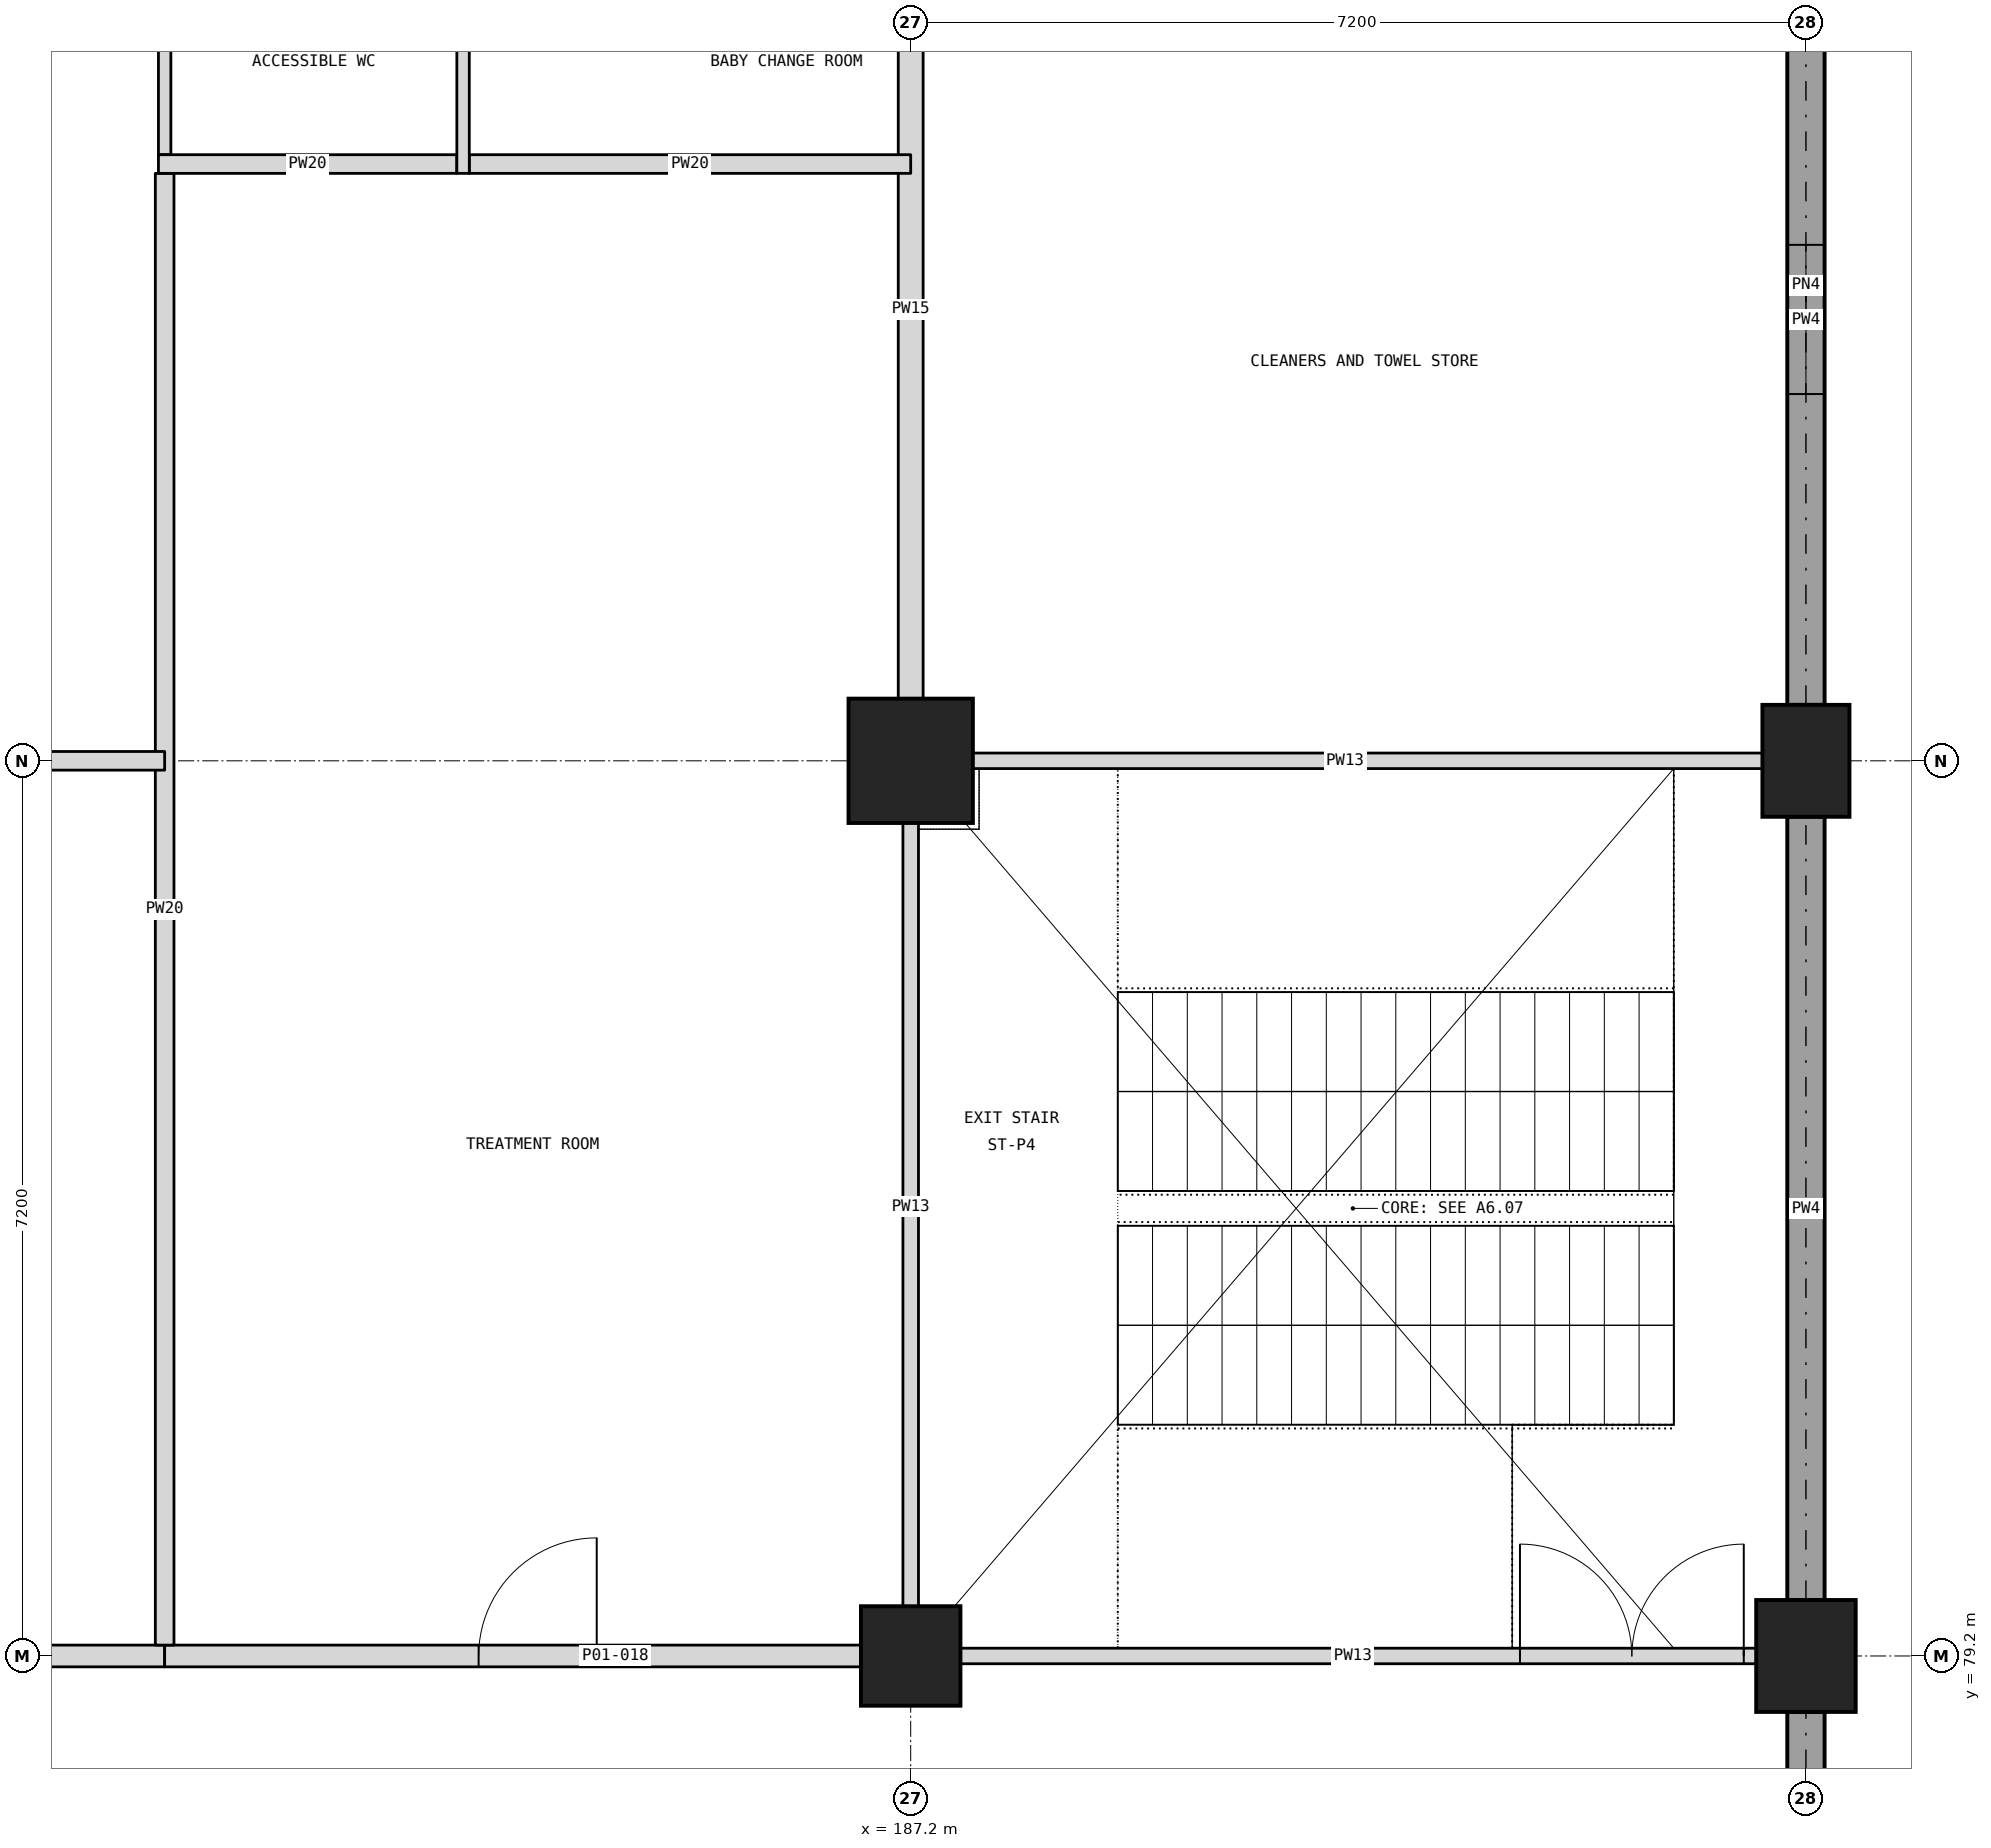
"""IFC4 building model, lengths in metres.
Left out: names, types, materials, properties, quantities, classifications, styles, units other than length and angle.
Written with IfcOpenShell. Run it as: python <this file> out.ifc"""

import sys

from ifc_helpers import new_model, si_unit, direction, frame, frame_2d, origin, origin_2d, place, context, subcontext, project, spatial, rectangle, extrude, element, fill, save


model = new_model("IFC4")
c1 = context("Model", 3, precision=1e-05, world=origin(), true_north=direction((0.0, 1.0)))
c2 = subcontext(c1, "Body", "Model", "MODEL_VIEW")
j1 = project(units=[si_unit("LENGTHUNIT", "METRE"), si_unit("PLANEANGLEUNIT", "RADIAN")], contexts=[c1])
p1 = place(None, origin())
s1 = spatial("IfcSite", under=j1, at=p1, CompositionType="ELEMENT")
p2 = place(p1, origin())
s2 = spatial("IfcBuilding", under=s1, at=p2, CompositionType="ELEMENT")
p3 = place(p2, frame((0.0, 0.0, 6.0)))
s3 = spatial("IfcBuildingStorey", under=s2, at=p3, CompositionType="ELEMENT", Elevation=6.0)
p4 = place(p3, frame((187.2, 79.2, 0.0), z_axis=(0.0, 0.0, 1.0), x_axis=(1.0, 0.0, 0.0)))
e1 = element("IfcColumn", 1, at=p4, inside=s3, PredefinedType="COLUMN", context=c2, shape_type="SweptSolid", body=[
    extrude(rectangle(XDim=0.8, YDim=0.8, at=origin_2d()), origin(), (0.0, 0.0, 1.0), 6.0),
])
p5 = place(p3, frame((187.2, 86.4, 0.0), z_axis=(0.0, 0.0, 1.0), x_axis=(1.0, 0.0, 0.0)))
e2 = element("IfcColumn", 2, at=p5, inside=s3, PredefinedType="COLUMN", context=c2, shape_type="SweptSolid", body=[
    extrude(rectangle(XDim=1.0, YDim=1.0, at=origin_2d()), origin(), (0.0, 0.0, 1.0), 6.0),
])
p6 = place(p3, frame((194.4, 79.2, 0.0), z_axis=(0.0, 0.0, 1.0), x_axis=(1.0, 0.0, 0.0)))
e3 = element("IfcColumn", 3, at=p6, inside=s3, PredefinedType="COLUMN", context=c2, shape_type="SweptSolid", body=[
    extrude(rectangle(XDim=0.8, YDim=0.9, at=origin_2d()), origin(), (0.0, 0.0, 1.0), 6.0),
])
p7 = place(p3, frame((194.4, 86.4, 0.0), z_axis=(0.0, 0.0, 1.0), x_axis=(1.0, 0.0, 0.0)))
e4 = element("IfcColumn", 4, at=p7, inside=s3, PredefinedType="COLUMN", context=c2, shape_type="SweptSolid", body=[
    extrude(rectangle(XDim=0.7, YDim=0.9, at=origin_2d()), origin(), (0.0, 0.0, 1.0), 6.0),
])
p8 = place(p3, frame((194.4, 72.45, 0.0), z_axis=(0.0, 0.0, 1.0), x_axis=(0.0, 1.0, 0.0)))
e5 = element("IfcWall", 5, at=p8, inside=s3, PredefinedType="SOLIDWALL", context=c2, shape_type="SweptSolid", body=[
    extrude(rectangle(XDim=6.3, YDim=0.3, at=frame_2d((3.15, 0.0))), origin(), (0.0, 0.0, 1.0), 5.1),
])
p9 = place(p8, frame((0.675, 0.0, 0.9)))
e6 = element("IfcOpeningElement", 6, at=p9, cuts=e5, PredefinedType="OPENING", context=c2, shape_type="SweptSolid", body=[
    extrude(rectangle(XDim=3.0, YDim=2.4, at=frame_2d((1.5, 1.2))), frame((0.0, 0.16, 0.0), z_axis=(0.0, -1.0, 0.0), x_axis=(1.0, 0.0, 0.0)), (0.0, 0.0, 1.0), 0.32),
])
p10 = place(p3, frame((194.4, 79.65, 0.0), z_axis=(0.0, 0.0, 1.0), x_axis=(0.0, 1.0, 0.0)))
e7 = element("IfcWall", 7, at=p10, inside=s3, PredefinedType="SOLIDWALL", context=c2, shape_type="SweptSolid", body=[
    extrude(rectangle(XDim=6.3, YDim=0.3, at=frame_2d((3.15, 0.0))), origin(), (0.0, 0.0, 1.0), 5.1),
])
p11 = place(p3, frame((194.4, 86.85, 0.0), z_axis=(0.0, 0.0, 1.0), x_axis=(0.0, 1.0, 0.0)))
e8 = element("IfcWall", 8, at=p11, inside=s3, PredefinedType="SOLIDWALL", context=c2, shape_type="SweptSolid", body=[
    extrude(rectangle(XDim=6.2, YDim=0.3, at=frame_2d((3.1, 0.0))), origin(), (0.0, 0.0, 1.0), 5.1),
])
p12 = place(p11, frame((2.5, 0.0, 0.9)))
e9 = element("IfcOpeningElement", 9, at=p12, cuts=e8, PredefinedType="OPENING", context=c2, shape_type="SweptSolid", body=[
    extrude(rectangle(XDim=1.2, YDim=1.2, at=frame_2d((0.6, 0.6))), frame((0.0, 0.16, 0.0), z_axis=(0.0, -1.0, 0.0), x_axis=(1.0, 0.0, 0.0)), (0.0, 0.0, 1.0), 0.32),
])
p13 = place(p3, frame((187.2, 79.288, 0.0), z_axis=(0.0, 0.0, 1.0), x_axis=(0.0, 1.0, 0.0)))
e10 = element("IfcWall", 10, at=p13, inside=s3, PredefinedType="SOLIDWALL", context=c2, shape_type="SweptSolid", body=[
    extrude(rectangle(XDim=7.05, YDim=0.125, at=frame_2d((3.525, 0.0))), origin(), (0.0, 0.0, 1.0), 5.5),
])
p14 = place(p3, frame((187.2, 86.462, 0.0), z_axis=(0.0, 0.0, 1.0), x_axis=(0.0, 1.0, 0.0)))
e11 = element("IfcWall", 11, at=p14, inside=s3, PredefinedType="PARTITIONING", context=c2, shape_type="SweptSolid", body=[
    extrude(rectangle(XDim=7.138, YDim=0.2, at=frame_2d((3.569, 0.0))), origin(), (0.0, 0.0, 1.0), 5.5),
])
p15 = place(p3, frame((169.2, 79.2, 0.0), z_axis=(0.0, 0.0, 1.0), x_axis=(1.0, 0.0, 0.0)))
e12 = element("IfcWall", 12, at=p15, inside=s3, PredefinedType="PARTITIONING", context=c2, shape_type="SweptSolid", body=[
    extrude(rectangle(XDim=12.0, YDim=0.175, at=frame_2d((6.0, 0.0))), origin(), (0.0, 0.0, 1.0), 5.5),
])
p16 = place(p15, frame((5.5, 0.0, 0.0)))
e13 = element("IfcOpeningElement", 13, at=p16, cuts=e12, PredefinedType="OPENING", context=c2, shape_type="SweptSolid", body=[
    extrude(rectangle(XDim=1.0, YDim=2.1, at=frame_2d((0.5, 1.05))), frame((0.0, 0.097, 0.0), z_axis=(0.0, -1.0, 0.0), x_axis=(1.0, 0.0, 0.0)), (0.0, 0.0, 1.0), 0.195),
])
p17 = place(p3, frame((181.2, 79.2, 0.0), z_axis=(0.0, 0.0, 1.0), x_axis=(1.0, 0.0, 0.0)))
e14 = element("IfcWall", 14, at=p17, inside=s3, PredefinedType="PARTITIONING", context=c2, shape_type="SweptSolid", body=[
    extrude(rectangle(XDim=6.062, YDim=0.175, at=frame_2d((3.031, 0.0))), origin(), (0.0, 0.0, 1.0), 5.5),
])
p18 = place(p17, frame((2.525, 0.0, 0.0)))
e15 = element("IfcOpeningElement", 15, at=p18, cuts=e14, PredefinedType="OPENING", context=c2, shape_type="SweptSolid", body=[
    extrude(rectangle(XDim=0.95, YDim=2.1, at=frame_2d((0.475, 1.05))), frame((0.0, 0.097, 0.0), z_axis=(0.0, -1.0, 0.0), x_axis=(1.0, 0.0, 0.0)), (0.0, 0.0, 1.0), 0.195),
])
p19 = place(p3, frame((187.262, 79.2, 0.0), z_axis=(0.0, 0.0, 1.0), x_axis=(1.0, 0.0, 0.0)))
e16 = element("IfcWall", 16, at=p19, inside=s3, PredefinedType="SOLIDWALL", context=c2, shape_type="SweptSolid", body=[
    extrude(rectangle(XDim=6.988, YDim=0.125, at=frame_2d((3.494, 0.0))), origin(), (0.0, 0.0, 1.0), 5.5),
])
p20 = place(p19, frame((4.837, 0.0, 0.0)))
e17 = element("IfcOpeningElement", 17, at=p20, cuts=e16, PredefinedType="OPENING", context=c2, shape_type="SweptSolid", body=[
    extrude(rectangle(XDim=1.8, YDim=2.1, at=frame_2d((0.9, 1.05))), frame((0.0, 0.073, 0.0), z_axis=(0.0, -1.0, 0.0), x_axis=(1.0, 0.0, 0.0)), (0.0, 0.0, 1.0), 0.145),
])
p21 = place(p3, frame((181.2, 79.288, 0.0), z_axis=(0.0, 0.0, 1.0), x_axis=(0.0, 1.0, 0.0)))
e18 = element("IfcWall", 18, at=p21, inside=s3, PredefinedType="PARTITIONING", context=c2, shape_type="SweptSolid", body=[
    extrude(rectangle(XDim=11.837, YDim=0.15, at=frame_2d((5.919, 0.0))), origin(), (0.0, 0.0, 1.0), 5.5),
])
p22 = place(p3, frame((181.2, 91.275, 0.0), z_axis=(0.0, 0.0, 1.0), x_axis=(0.0, 1.0, 0.0)))
e19 = element("IfcWall", 19, at=p22, inside=s3, PredefinedType="PARTITIONING", context=c2, shape_type="SweptSolid", body=[
    extrude(rectangle(XDim=2.5, YDim=0.1, at=frame_2d((1.25, 0.0))), origin(), (0.0, 0.0, 1.0), 5.5),
])
p23 = place(p3, frame((175.25, 86.4, 0.0), z_axis=(0.0, 0.0, 1.0), x_axis=(1.0, 0.0, 0.0)))
e20 = element("IfcWall", 20, at=p23, inside=s3, PredefinedType="PARTITIONING", context=c2, shape_type="SweptSolid", body=[
    extrude(rectangle(XDim=5.95, YDim=0.15, at=frame_2d((2.975, 0.0))), origin(), (0.0, 0.0, 1.0), 5.5),
])
p24 = place(p3, frame((187.137, 86.4, 0.0), z_axis=(0.0, 0.0, 1.0), x_axis=(1.0, 0.0, 0.0)))
e21 = element("IfcWall", 21, at=p24, inside=s3, PredefinedType="SOLIDWALL", context=c2, shape_type="SweptSolid", body=[
    extrude(rectangle(XDim=7.113, YDim=0.125, at=frame_2d((3.556, 0.0))), origin(), (0.0, 0.0, 1.0), 5.5),
])
p25 = place(p3, frame((181.15, 91.2, 0.0), z_axis=(0.0, 0.0, 1.0), x_axis=(1.0, 0.0, 0.0)))
e22 = element("IfcWall", 22, at=p25, inside=s3, PredefinedType="PARTITIONING", context=c2, shape_type="SweptSolid", body=[
    extrude(rectangle(XDim=2.4, YDim=0.15, at=frame_2d((1.2, 0.0))), origin(), (0.0, 0.0, 1.0), 5.5),
])
p26 = place(p3, frame((183.65, 91.2, 0.0), z_axis=(0.0, 0.0, 1.0), x_axis=(1.0, 0.0, 0.0)))
e23 = element("IfcWall", 23, at=p26, inside=s3, PredefinedType="PARTITIONING", context=c2, shape_type="SweptSolid", body=[
    extrude(rectangle(XDim=3.55, YDim=0.15, at=frame_2d((1.775, 0.0))), origin(), (0.0, 0.0, 1.0), 5.5),
])
p27 = place(p3, frame((183.6, 91.125, 0.0), z_axis=(0.0, 0.0, 1.0), x_axis=(0.0, 1.0, 0.0)))
e24 = element("IfcWall", 24, at=p27, inside=s3, PredefinedType="PARTITIONING", context=c2, shape_type="SweptSolid", body=[
    extrude(rectangle(XDim=2.65, YDim=0.1, at=frame_2d((1.325, 0.0))), origin(), (0.0, 0.0, 1.0), 5.5),
])
p28 = place(p12, origin())
e25 = element("IfcWindow", 25, at=p28, inside=s3, PartitioningType="SINGLE_PANEL", PredefinedType="WINDOW", context=c2, shape_type="SweptSolid", body=[
    extrude(rectangle(XDim=1.2, YDim=1.2, at=frame_2d((0.6, 0.6))), frame((0.0, 0.12, 0.0), z_axis=(0.0, -1.0, 0.0), x_axis=(1.0, 0.0, 0.0)), (0.0, 0.0, 1.0), 0.06),
])
fill(e9, e25)
p29 = place(p18, origin())
e26 = element("IfcDoor", 26, at=p29, inside=s3, OperationType="SINGLE_SWING_RIGHT", PredefinedType="DOOR", context=c2, shape_type="SweptSolid", body=[
    extrude(rectangle(XDim=0.95, YDim=2.1, at=frame_2d((0.475, 1.05))), frame((0.0, 0.025, 0.0), z_axis=(0.0, -1.0, 0.0), x_axis=(1.0, 0.0, 0.0)), (0.0, 0.0, 1.0), 0.05),
])
fill(e15, e26)
p30 = place(p20, origin())
e27 = element("IfcDoor", 27, at=p30, inside=s3, OperationType="DOUBLE_DOOR_SINGLE_SWING", PredefinedType="DOOR", context=c2, shape_type="SweptSolid", body=[
    extrude(rectangle(XDim=1.8, YDim=2.1, at=frame_2d((0.9, 1.05))), frame((0.0, 0.025, 0.0), z_axis=(0.0, -1.0, 0.0), x_axis=(1.0, 0.0, 0.0)), (0.0, 0.0, 1.0), 0.05),
])
fill(e17, e27)
save(model, sys.argv[1])
